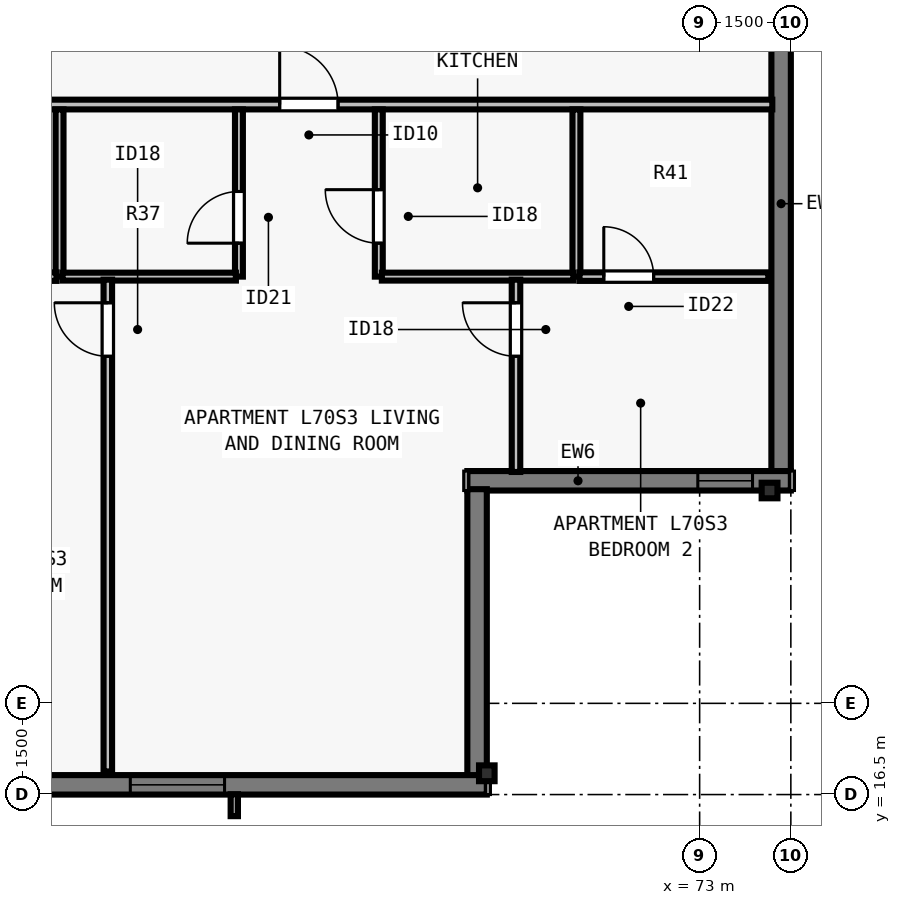
"""IFC4 building model, lengths in metres.
Left out: names, types, materials, properties, quantities, classifications, styles, units other than length and angle.
Written with IfcOpenShell. Run it as: python <this file> out.ifc"""

import sys

from ifc_helpers import new_model, si_unit, direction, frame, frame_2d, origin, origin_2d, place, context, subcontext, project, spatial, rectangle, i_section, extrude, element, fill, save


model = new_model("IFC4")
c1 = context("Model", 3, precision=1e-05, world=origin(), true_north=direction((0.0, 1.0)))
c2 = subcontext(c1, "Body", "Model", "MODEL_VIEW")
j1 = project(units=[si_unit("LENGTHUNIT", "METRE"), si_unit("PLANEANGLEUNIT", "RADIAN")], contexts=[c1])
p1 = place(None, origin())
s1 = spatial("IfcSite", under=j1, at=p1, CompositionType="ELEMENT")
p2 = place(p1, origin())
s2 = spatial("IfcBuilding", under=s1, at=p2, CompositionType="ELEMENT")
p3 = place(p2, frame((0.0, 0.0, 255.0)))
s3 = spatial("IfcBuildingStorey", under=s2, at=p3, CompositionType="ELEMENT", Elevation=255.0)
for number, where, z_axis, x_axis in (
    (1, (69.5, 16.85, 0.0), (0.0, 0.0, 1.0), (1.0, 0.0, 0.0)),
    (2, (74.15, 21.5, 0.0), (0.0, 0.0, 1.0), (0.0, 1.0, 0.0)),
):
    element("IfcColumn", number, at=place(p3, frame(where, z_axis=z_axis, x_axis=x_axis)), inside=s3, PredefinedType="COLUMN", context=c2, shape_type="SweptSolid", body=[
        extrude(i_section(OverallWidth=0.256, OverallDepth=0.26, WebThickness=0.01, FlangeThickness=0.017, FilletRadius=0.013, at=origin_2d()), origin(), (0.0, 0.0, 1.0), 3.5),
    ])
p4 = place(p3, frame((74.34, 56.5, 0.0), z_axis=(0.0, 0.0, 1.0), x_axis=(0.0, -1.0, 0.0)))
e3 = element("IfcWall", 3, at=p4, inside=s3, PredefinedType="SOLIDWALL", context=c2, shape_type="SweptSolid", body=[
    extrude(rectangle(XDim=34.702, YDim=0.32, at=frame_2d((17.351, 0.0))), origin(), (0.0, 0.0, 1.0), 3.29),
])
p5 = place(p4, frame((6.738, 0.0, 0.8)))
e4 = element("IfcOpeningElement", 4, at=p5, cuts=e3, PredefinedType="OPENING", context=c2, shape_type="SweptSolid", body=[
    extrude(rectangle(XDim=1.85, YDim=1.678, at=frame_2d((0.925, 0.839))), frame((0.0, 0.17, 0.0), z_axis=(0.0, -1.0, 0.0), x_axis=(1.0, 0.0, 0.0)), (0.0, 0.0, 1.0), 0.34),
])
p6 = place(p4, frame((10.263, 0.0, 0.8)))
e5 = element("IfcOpeningElement", 5, at=p6, cuts=e3, PredefinedType="OPENING", context=c2, shape_type="SweptSolid", body=[
    extrude(rectangle(XDim=1.55, YDim=1.678, at=frame_2d((0.775, 0.839))), frame((0.0, 0.17, 0.0), z_axis=(0.0, -1.0, 0.0), x_axis=(1.0, 0.0, 0.0)), (0.0, 0.0, 1.0), 0.34),
])
p7 = place(p4, frame((18.264, 0.0, 0.8)))
e6 = element("IfcOpeningElement", 6, at=p7, cuts=e3, PredefinedType="OPENING", context=c2, shape_type="SweptSolid", body=[
    extrude(rectangle(XDim=1.55, YDim=1.678, at=frame_2d((0.775, 0.839))), frame((0.0, 0.17, 0.0), z_axis=(0.0, -1.0, 0.0), x_axis=(1.0, 0.0, 0.0)), (0.0, 0.0, 1.0), 0.34),
])
p8 = place(p4, frame((24.164, 0.0, 0.8)))
e7 = element("IfcOpeningElement", 7, at=p8, cuts=e3, PredefinedType="OPENING", context=c2, shape_type="SweptSolid", body=[
    extrude(rectangle(XDim=1.55, YDim=1.678, at=frame_2d((0.775, 0.839))), frame((0.0, 0.17, 0.0), z_axis=(0.0, -1.0, 0.0), x_axis=(1.0, 0.0, 0.0)), (0.0, 0.0, 1.0), 0.34),
])
p9 = place(p4, frame((14.39, 0.0, 0.8)))
e8 = element("IfcOpeningElement", 8, at=p9, cuts=e3, PredefinedType="OPENING", context=c2, shape_type="SweptSolid", body=[
    extrude(rectangle(XDim=0.9, YDim=1.678, at=frame_2d((0.45, 0.839))), frame((0.0, 0.17, 0.0), z_axis=(0.0, -1.0, 0.0), x_axis=(1.0, 0.0, 0.0)), (0.0, 0.0, 1.0), 0.34),
])
p10 = place(p3, frame((74.5, 21.66, 0.0), z_axis=(0.0, 0.0, 1.0), x_axis=(-1.0, 0.0, 0.0)))
e9 = element("IfcWall", 9, at=p10, inside=s3, PredefinedType="SOLIDWALL", context=c2, shape_type="SweptSolid", body=[
    extrude(rectangle(XDim=5.32, YDim=0.32, at=frame_2d((2.66, 0.0))), origin(), (0.0, 0.0, 1.0), 3.29),
])
p11 = place(p10, frame((0.63, 0.0, 0.8)))
e10 = element("IfcOpeningElement", 10, at=p11, cuts=e9, PredefinedType="OPENING", context=c2, shape_type="SweptSolid", body=[
    extrude(rectangle(XDim=0.9, YDim=1.678, at=frame_2d((0.45, 0.839))), frame((0.0, 0.17, 0.0), z_axis=(0.0, -1.0, 0.0), x_axis=(1.0, 0.0, 0.0)), (0.0, 0.0, 1.0), 0.34),
])
p12 = place(p3, frame((69.34, 21.522, 0.0), z_axis=(0.0, 0.0, 1.0), x_axis=(0.0, -1.0, 0.0)))
e11 = element("IfcWall", 11, at=p12, inside=s3, PredefinedType="SOLIDWALL", context=c2, shape_type="SweptSolid", body=[
    extrude(rectangle(XDim=4.724, YDim=0.32, at=frame_2d((2.362, 0.0))), origin(), (0.0, 0.0, 1.0), 3.29),
])
p13 = place(p3, frame((69.5, 16.66, 0.0), z_axis=(0.0, 0.0, 1.0), x_axis=(-1.0, 0.0, 0.0)))
e12 = element("IfcWall", 12, at=p13, inside=s3, PredefinedType="SOLIDWALL", context=c2, shape_type="SweptSolid", body=[
    extrude(rectangle(XDim=34.702, YDim=0.32, at=frame_2d((17.351, 0.0))), origin(), (0.0, 0.0, 1.0), 3.29),
])
p14 = place(p13, frame((4.312, 0.0, 0.8)))
e13 = element("IfcOpeningElement", 13, at=p14, cuts=e12, PredefinedType="OPENING", context=c2, shape_type="SweptSolid", body=[
    extrude(rectangle(XDim=1.55, YDim=1.678, at=frame_2d((0.775, 0.839))), frame((0.0, 0.17, 0.0), z_axis=(0.0, -1.0, 0.0), x_axis=(1.0, 0.0, 0.0)), (0.0, 0.0, 1.0), 0.34),
])
p15 = place(p13, frame((7.988, 0.0, 0.8)))
e14 = element("IfcOpeningElement", 14, at=p15, cuts=e12, PredefinedType="OPENING", context=c2, shape_type="SweptSolid", body=[
    extrude(rectangle(XDim=1.85, YDim=1.678, at=frame_2d((0.925, 0.839))), frame((0.0, 0.17, 0.0), z_axis=(0.0, -1.0, 0.0), x_axis=(1.0, 0.0, 0.0)), (0.0, 0.0, 1.0), 0.34),
])
p16 = place(p13, frame((15.188, 0.0, 0.8)))
e15 = element("IfcOpeningElement", 15, at=p16, cuts=e12, PredefinedType="OPENING", context=c2, shape_type="SweptSolid", body=[
    extrude(rectangle(XDim=1.85, YDim=1.678, at=frame_2d((0.925, 0.839))), frame((0.0, 0.17, 0.0), z_axis=(0.0, -1.0, 0.0), x_axis=(1.0, 0.0, 0.0)), (0.0, 0.0, 1.0), 0.34),
])
p17 = place(p13, frame((18.264, 0.0, 0.8)))
e16 = element("IfcOpeningElement", 16, at=p17, cuts=e12, PredefinedType="OPENING", context=c2, shape_type="SweptSolid", body=[
    extrude(rectangle(XDim=1.55, YDim=1.678, at=frame_2d((0.775, 0.839))), frame((0.0, 0.17, 0.0), z_axis=(0.0, -1.0, 0.0), x_axis=(1.0, 0.0, 0.0)), (0.0, 0.0, 1.0), 0.34),
])
p18 = place(p13, frame((25.014, 0.0, 0.8)))
e17 = element("IfcOpeningElement", 17, at=p18, cuts=e12, PredefinedType="OPENING", context=c2, shape_type="SweptSolid", body=[
    extrude(rectangle(XDim=1.55, YDim=1.678, at=frame_2d((0.775, 0.839))), frame((0.0, 0.17, 0.0), z_axis=(0.0, -1.0, 0.0), x_axis=(1.0, 0.0, 0.0)), (0.0, 0.0, 1.0), 0.34),
])
p19 = place(p13, frame((20.63, 0.0, 0.8)))
e18 = element("IfcOpeningElement", 18, at=p19, cuts=e12, PredefinedType="OPENING", context=c2, shape_type="SweptSolid", body=[
    extrude(rectangle(XDim=0.9, YDim=1.678, at=frame_2d((0.45, 0.839))), frame((0.0, 0.17, 0.0), z_axis=(0.0, -1.0, 0.0), x_axis=(1.0, 0.0, 0.0)), (0.0, 0.0, 1.0), 0.34),
])
p20 = place(p13, frame((10.87, 0.0, 0.8)))
e19 = element("IfcOpeningElement", 19, at=p20, cuts=e12, PredefinedType="OPENING", context=c2, shape_type="SweptSolid", body=[
    extrude(rectangle(XDim=0.9, YDim=1.678, at=frame_2d((0.45, 0.839))), frame((0.0, 0.17, 0.0), z_axis=(0.0, -1.0, 0.0), x_axis=(1.0, 0.0, 0.0)), (0.0, 0.0, 1.0), 0.34),
])
p21 = place(p3, frame((32.06, 27.847, 0.0), z_axis=(0.0, 0.0, 1.0), x_axis=(1.0, 0.0, 0.0)))
e20 = element("IfcWall", 20, at=p21, inside=s3, PredefinedType="PARTITIONING", context=c2, shape_type="SweptSolid", body=[
    extrude(rectangle(XDim=42.135, YDim=0.16, at=frame_2d((21.067, 0.0))), origin(), (0.0, 0.0, 1.0), 2.958),
])
p22 = place(p21, frame((4.951, 0.0, 0.0)))
e21 = element("IfcOpeningElement", 21, at=p22, cuts=e20, PredefinedType="OPENING", context=c2, shape_type="SweptSolid", body=[
    extrude(rectangle(XDim=0.96, YDim=2.18, at=frame_2d((0.48, 1.09))), frame((0.0, 0.09, 0.0), z_axis=(0.0, -1.0, 0.0), x_axis=(1.0, 0.0, 0.0)), (0.0, 0.0, 1.0), 0.18),
])
p23 = place(p21, frame((19.525, 0.0, 0.0)))
e22 = element("IfcOpeningElement", 22, at=p23, cuts=e20, PredefinedType="OPENING", context=c2, shape_type="SweptSolid", body=[
    extrude(rectangle(XDim=0.96, YDim=2.18, at=frame_2d((0.48, 1.09))), frame((0.0, 0.09, 0.0), z_axis=(0.0, -1.0, 0.0), x_axis=(1.0, 0.0, 0.0)), (0.0, 0.0, 1.0), 0.18),
])
p24 = place(p21, frame((34.034, 0.0, 0.0)))
e23 = element("IfcOpeningElement", 23, at=p24, cuts=e20, PredefinedType="OPENING", context=c2, shape_type="SweptSolid", body=[
    extrude(rectangle(XDim=0.96, YDim=2.18, at=frame_2d((0.48, 1.09))), frame((0.0, 0.09, 0.0), z_axis=(0.0, -1.0, 0.0), x_axis=(1.0, 0.0, 0.0)), (0.0, 0.0, 1.0), 0.18),
])
p25 = place(p3, frame((62.474, 25.018, 0.0), z_axis=(0.0, 0.0, 1.0), x_axis=(0.0, 1.0, 0.0)))
e24 = element("IfcWall", 24, at=p25, inside=s3, PredefinedType="PLUMBINGWALL", context=c2, shape_type="SweptSolid", body=[
    extrude(rectangle(XDim=2.75, YDim=0.13, at=frame_2d((1.375, 0.0))), origin(), (0.0, 0.0, 1.0), 2.573),
])
p26 = place(p3, frame((65.424, 25.018, 0.0), z_axis=(0.0, 0.0, 1.0), x_axis=(0.0, 1.0, 0.0)))
e25 = element("IfcWall", 25, at=p26, inside=s3, PredefinedType="PLUMBINGWALL", context=c2, shape_type="SweptSolid", body=[
    extrude(rectangle(XDim=2.75, YDim=0.13, at=frame_2d((1.375, 0.0))), origin(), (0.0, 0.0, 1.0), 3.29),
])
p27 = place(p26, frame((0.55, 0.0, 0.0)))
e26 = element("IfcOpeningElement", 26, at=p27, cuts=e25, PredefinedType="OPENING", context=c2, shape_type="SweptSolid", body=[
    extrude(rectangle(XDim=0.85, YDim=2.08, at=frame_2d((0.425, 1.04))), frame((0.0, 0.075, 0.0), z_axis=(0.0, -1.0, 0.0), x_axis=(1.0, 0.0, 0.0)), (0.0, 0.0, 1.0), 0.15),
])
p28 = place(p3, frame((62.524, 25.018, 0.0), z_axis=(0.0, 0.0, 1.0), x_axis=(1.0, 0.0, 0.0)))
e27 = element("IfcWall", 27, at=p28, inside=s3, PredefinedType="PLUMBINGWALL", context=c2, shape_type="SweptSolid", body=[
    extrude(rectangle(XDim=2.85, YDim=0.13, at=frame_2d((1.425, 0.0))), origin(), (0.0, 0.0, 1.0), 3.29),
])
p29 = place(p3, frame((70.974, 25.018, 0.0), z_axis=(0.0, 0.0, 1.0), x_axis=(0.0, 1.0, 0.0)))
e28 = element("IfcWall", 28, at=p29, inside=s3, PredefinedType="PLUMBINGWALL", context=c2, shape_type="SweptSolid", body=[
    extrude(rectangle(XDim=2.75, YDim=0.13, at=frame_2d((1.375, 0.0))), origin(), (0.0, 0.0, 1.0), 3.29),
])
p30 = place(p3, frame((67.724, 25.018, 0.0), z_axis=(0.0, 0.0, 1.0), x_axis=(0.0, 1.0, 0.0)))
e29 = element("IfcWall", 29, at=p30, inside=s3, PredefinedType="PLUMBINGWALL", context=c2, shape_type="SweptSolid", body=[
    extrude(rectangle(XDim=2.75, YDim=0.13, at=frame_2d((1.375, 0.0))), origin(), (0.0, 0.0, 1.0), 3.29),
])
p31 = place(p30, frame((0.55, 0.0, 0.0)))
e30 = element("IfcOpeningElement", 30, at=p31, cuts=e29, PredefinedType="OPENING", context=c2, shape_type="SweptSolid", body=[
    extrude(rectangle(XDim=0.88, YDim=2.1, at=frame_2d((0.44, 1.05))), frame((0.0, 0.075, 0.0), z_axis=(0.0, -1.0, 0.0), x_axis=(1.0, 0.0, 0.0)), (0.0, 0.0, 1.0), 0.15),
])
p32 = place(p3, frame((67.774, 25.018, 0.0), z_axis=(0.0, 0.0, 1.0), x_axis=(1.0, 0.0, 0.0)))
e31 = element("IfcWall", 31, at=p32, inside=s3, PredefinedType="PLUMBINGWALL", context=c2, shape_type="SweptSolid", body=[
    extrude(rectangle(XDim=3.15, YDim=0.13, at=frame_2d((1.575, 0.0))), origin(), (0.0, 0.0, 1.0), 2.958),
])
p33 = place(p3, frame((63.268, 16.88, 0.0), z_axis=(0.0, 0.0, 1.0), x_axis=(0.0, 1.0, 0.0)))
e32 = element("IfcWall", 32, at=p33, inside=s3, PredefinedType="PARTITIONING", context=c2, shape_type="SweptSolid", body=[
    extrude(rectangle(XDim=8.088, YDim=0.14, at=frame_2d((4.044, 0.0))), origin(), (0.0, 0.0, 1.0), 3.29),
])
p34 = place(p33, frame((6.827, 0.0, 0.0)))
e33 = element("IfcOpeningElement", 33, at=p34, cuts=e32, PredefinedType="OPENING", context=c2, shape_type="SweptSolid", body=[
    extrude(rectangle(XDim=0.88, YDim=2.1, at=frame_2d((0.44, 1.05))), frame((0.0, 0.08, 0.0), z_axis=(0.0, -1.0, 0.0), x_axis=(1.0, 0.0, 0.0)), (0.0, 0.0, 1.0), 0.16),
])
p35 = place(p3, frame((59.133, 25.018, 0.0), z_axis=(0.0, 0.0, 1.0), x_axis=(1.0, 0.0, 0.0)))
e34 = element("IfcWall", 34, at=p35, inside=s3, PredefinedType="PARTITIONING", context=c2, shape_type="SweptSolid", body=[
    extrude(rectangle(XDim=3.291, YDim=0.14, at=frame_2d((1.646, 0.0))), origin(), (0.0, 0.0, 1.0), 3.29),
])
p36 = place(p35, frame((0.335, 0.0, 0.0)))
e35 = element("IfcOpeningElement", 35, at=p36, cuts=e34, PredefinedType="OPENING", context=c2, shape_type="SweptSolid", body=[
    extrude(rectangle(XDim=0.82, YDim=2.1, at=frame_2d((0.41, 1.05))), frame((0.0, 0.08, 0.0), z_axis=(0.0, -1.0, 0.0), x_axis=(1.0, 0.0, 0.0)), (0.0, 0.0, 1.0), 0.16),
])
p37 = place(p3, frame((69.98, 21.805, 0.0), z_axis=(0.0, 0.0, 1.0), x_axis=(0.0, 1.0, 0.0)))
e36 = element("IfcWall", 36, at=p37, inside=s3, PredefinedType="PARTITIONING", context=c2, shape_type="SweptSolid", body=[
    extrude(rectangle(XDim=3.163, YDim=0.14, at=frame_2d((1.581, 0.0))), origin(), (0.0, 0.0, 1.0), 3.29),
])
p38 = place(p37, frame((1.903, 0.0, 0.0)))
e37 = element("IfcOpeningElement", 37, at=p38, cuts=e36, PredefinedType="OPENING", context=c2, shape_type="SweptSolid", body=[
    extrude(rectangle(XDim=0.88, YDim=2.1, at=frame_2d((0.44, 1.05))), frame((0.0, 0.08, 0.0), z_axis=(0.0, -1.0, 0.0), x_axis=(1.0, 0.0, 0.0)), (0.0, 0.0, 1.0), 0.16),
])
p39 = place(p3, frame((71.024, 25.018, 0.0), z_axis=(0.0, 0.0, 1.0), x_axis=(1.0, 0.0, 0.0)))
e38 = element("IfcWall", 38, at=p39, inside=s3, PredefinedType="PARTITIONING", context=c2, shape_type="SweptSolid", body=[
    extrude(rectangle(XDim=3.106, YDim=0.14, at=frame_2d((1.553, 0.0))), origin(), (0.0, 0.0, 1.0), 3.29),
])
p40 = place(p39, frame((0.4, 0.0, 0.0)))
e39 = element("IfcOpeningElement", 39, at=p40, cuts=e38, PredefinedType="OPENING", context=c2, shape_type="SweptSolid", body=[
    extrude(rectangle(XDim=0.82, YDim=2.1, at=frame_2d((0.41, 1.05))), frame((0.0, 0.08, 0.0), z_axis=(0.0, -1.0, 0.0), x_axis=(1.0, 0.0, 0.0)), (0.0, 0.0, 1.0), 0.16),
])
p41 = place(p14, origin())
e40 = element("IfcWindow", 40, at=p41, inside=s3, PartitioningType="SINGLE_PANEL", PredefinedType="WINDOW", context=c2, shape_type="SweptSolid", body=[
    extrude(rectangle(XDim=1.55, YDim=1.678, at=frame_2d((0.775, 0.839))), frame((0.0, -0.05, 0.0), z_axis=(0.0, -1.0, 0.0), x_axis=(1.0, 0.0, 0.0)), (0.0, 0.0, 1.0), 0.06),
])
fill(e13, e40)
p42 = place(p11, origin())
e41 = element("IfcWindow", 41, at=p42, inside=s3, PartitioningType="SINGLE_PANEL", PredefinedType="WINDOW", context=c2, shape_type="SweptSolid", body=[
    extrude(rectangle(XDim=0.9, YDim=1.678, at=frame_2d((0.45, 0.839))), frame((0.0, -0.04, 0.0), z_axis=(0.0, -1.0, 0.0), x_axis=(1.0, 0.0, 0.0)), (0.0, 0.0, 1.0), 0.06),
])
fill(e10, e41)
p43 = place(p27, origin())
e42 = element("IfcDoor", 42, at=p43, inside=s3, OperationType="SINGLE_SWING_LEFT", PredefinedType="DOOR", context=c2, shape_type="SweptSolid", body=[
    extrude(rectangle(XDim=0.85, YDim=2.08, at=frame_2d((0.425, 1.04))), frame((0.0, 0.025, 0.0), z_axis=(0.0, -1.0, 0.0), x_axis=(1.0, 0.0, 0.0)), (0.0, 0.0, 1.0), 0.05),
])
fill(e26, e42)
p44 = place(p31, origin())
e43 = element("IfcDoor", 43, at=p44, inside=s3, OperationType="SINGLE_SWING_RIGHT", PredefinedType="DOOR", context=c2, shape_type="SweptSolid", body=[
    extrude(rectangle(XDim=0.88, YDim=2.1, at=frame_2d((0.44, 1.05))), frame((0.0, 0.025, 0.0), z_axis=(0.0, -1.0, 0.0), x_axis=(1.0, 0.0, 0.0)), (0.0, 0.0, 1.0), 0.05),
])
fill(e30, e43)
p45 = place(p34, origin())
e44 = element("IfcDoor", 44, at=p45, inside=s3, OperationType="SINGLE_SWING_RIGHT", PredefinedType="DOOR", context=c2, shape_type="SweptSolid", body=[
    extrude(rectangle(XDim=0.88, YDim=2.1, at=frame_2d((0.44, 1.05))), frame((0.0, 0.025, 0.0), z_axis=(0.0, -1.0, 0.0), x_axis=(1.0, 0.0, 0.0)), (0.0, 0.0, 1.0), 0.05),
])
fill(e33, e44)
p46 = place(p40, origin())
e45 = element("IfcDoor", 45, at=p46, inside=s3, OperationType="SINGLE_SWING_LEFT", PredefinedType="DOOR", context=c2, shape_type="SweptSolid", body=[
    extrude(rectangle(XDim=0.82, YDim=2.1, at=frame_2d((0.41, 1.05))), frame((0.0, 0.025, 0.0), z_axis=(0.0, -1.0, 0.0), x_axis=(1.0, 0.0, 0.0)), (0.0, 0.0, 1.0), 0.05),
])
fill(e39, e45)
p47 = place(p38, origin())
e46 = element("IfcDoor", 46, at=p47, inside=s3, OperationType="SINGLE_SWING_RIGHT", PredefinedType="DOOR", context=c2, shape_type="SweptSolid", body=[
    extrude(rectangle(XDim=0.88, YDim=2.1, at=frame_2d((0.44, 1.05))), frame((0.0, 0.025, 0.0), z_axis=(0.0, -1.0, 0.0), x_axis=(1.0, 0.0, 0.0)), (0.0, 0.0, 1.0), 0.05),
])
fill(e37, e46)
p48 = place(p24, origin())
e47 = element("IfcDoor", 47, at=p48, inside=s3, OperationType="SINGLE_SWING_LEFT", PredefinedType="DOOR", context=c2, shape_type="SweptSolid", body=[
    extrude(rectangle(XDim=0.96, YDim=2.18, at=frame_2d((0.48, 1.09))), frame((0.0, 0.025, 0.0), z_axis=(0.0, -1.0, 0.0), x_axis=(1.0, 0.0, 0.0)), (0.0, 0.0, 1.0), 0.05),
])
fill(e23, e47)
save(model, sys.argv[1])
